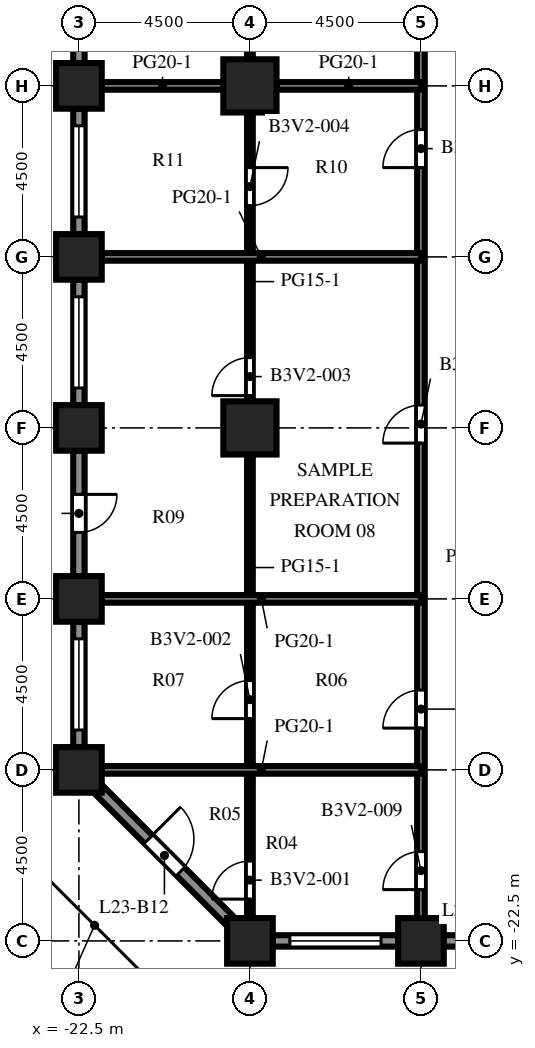
"""IFC4 building model, lengths in metres.
Left out: names, types, materials, properties, quantities, classifications, styles, units other than length and angle.
Written with IfcOpenShell. Run it as: python <this file> out.ifc"""

import sys

from ifc_helpers import new_model, si_unit, direction, frame, frame_2d, origin, origin_2d, place, context, subcontext, project, spatial, rectangle, extrude, element, fill, save


model = new_model("IFC4")
c1 = context("Model", 3, precision=1e-05, world=origin(), true_north=direction((0.0, 1.0)))
c2 = subcontext(c1, "Body", "Model", "MODEL_VIEW")
j1 = project(units=[si_unit("LENGTHUNIT", "METRE"), si_unit("PLANEANGLEUNIT", "RADIAN")], contexts=[c1])
p1 = place(None, origin())
s1 = spatial("IfcSite", under=j1, at=p1, CompositionType="ELEMENT")
p2 = place(p1, origin())
s2 = spatial("IfcBuilding", under=s1, at=p2, CompositionType="ELEMENT")
p3 = place(p2, frame((0.0, 0.0, 102.5)))
s3 = spatial("IfcBuildingStorey", under=s2, at=p3, CompositionType="ELEMENT", Elevation=102.5)
for number, where, z_axis, x_axis in (
    (1, (-22.5, -18.0, 0.0), (0.0, 0.0, 1.0), (1.0, 0.0, 0.0)),
    (2, (-22.5, -13.5, 0.0), (0.0, 0.0, 1.0), (1.0, 0.0, 0.0)),
    (3, (-22.5, -9.0, 0.0), (0.0, 0.0, 1.0), (1.0, 0.0, 0.0)),
    (4, (-22.5, -4.5, 0.0), (0.0, 0.0, 1.0), (1.0, 0.0, 0.0)),
    (5, (-22.5, 0.0, 0.0), (0.0, 0.0, 1.0), (1.0, 0.0, 0.0)),
    (6, (-18.0, -22.5, 0.0), (0.0, 0.0, 1.0), (1.0, 0.0, 0.0)),
    (7, (-13.5, -22.5, 0.0), (0.0, 0.0, 1.0), (1.0, 0.0, 0.0)),
):
    element("IfcColumn", number, at=place(p3, frame(where, z_axis=z_axis, x_axis=x_axis)), inside=s3, PredefinedType="COLUMN", context=c2, shape_type="SweptSolid", body=[
        extrude(rectangle(XDim=1.2, YDim=1.2, at=origin_2d()), origin(), (0.0, 0.0, 1.0), 4.1),
    ])
for number, where, z_axis, x_axis in (
    (8, (-18.0, -9.0, 0.0), (0.0, 0.0, 1.0), (1.0, 0.0, 0.0)),
    (9, (-18.0, 0.0, 0.0), (0.0, 0.0, 1.0), (1.0, 0.0, 0.0)),
):
    element("IfcColumn", number, at=place(p3, frame(where, z_axis=z_axis, x_axis=x_axis)), inside=s3, PredefinedType="COLUMN", context=c2, shape_type="SweptSolid", body=[
        extrude(rectangle(XDim=1.4, YDim=1.4, at=origin_2d()), origin(), (0.0, 0.0, 1.0), 4.1),
    ])
p4 = place(p3, frame((-14.1, -22.5, 0.0), z_axis=(0.0, 0.0, 1.0), x_axis=(-1.0, 0.0, 0.0)))
e10 = element("IfcWall", 10, at=p4, inside=s3, PredefinedType="SOLIDWALL", context=c2, shape_type="SweptSolid", body=[
    extrude(rectangle(XDim=3.3, YDim=0.3, at=frame_2d((1.65, 0.0))), origin(), (0.0, 0.0, 1.0), 2.75),
])
p5 = place(p4, frame((0.45, 0.0, 0.8)))
e11 = element("IfcOpeningElement", 11, at=p5, cuts=e10, PredefinedType="OPENING", context=c2, shape_type="SweptSolid", body=[
    extrude(rectangle(XDim=2.4, YDim=1.7, at=frame_2d((1.2, 0.85))), frame((0.0, 0.16, 0.0), z_axis=(0.0, -1.0, 0.0), x_axis=(1.0, 0.0, 0.0)), (0.0, 0.0, 1.0), 0.32),
])
p6 = place(p3, frame((-9.6, -22.5, 0.0), z_axis=(0.0, 0.0, 1.0), x_axis=(-1.0, 0.0, 0.0)))
e12 = element("IfcWall", 12, at=p6, inside=s3, PredefinedType="SOLIDWALL", context=c2, shape_type="SweptSolid", body=[
    extrude(rectangle(XDim=3.3, YDim=0.3, at=frame_2d((1.65, 0.0))), origin(), (0.0, 0.0, 1.0), 2.75),
])
p7 = place(p6, frame((1.15, 0.0, 0.0)))
e13 = element("IfcOpeningElement", 13, at=p7, cuts=e12, PredefinedType="OPENING", context=c2, shape_type="SweptSolid", body=[
    extrude(rectangle(XDim=1.0, YDim=2.2, at=frame_2d((0.5, 1.1))), frame((0.0, 0.16, 0.0), z_axis=(0.0, -1.0, 0.0), x_axis=(1.0, 0.0, 0.0)), (0.0, 0.0, 1.0), 0.32),
])
p8 = place(p3, frame((-22.5, 0.6, 0.0), z_axis=(0.0, 0.0, 1.0), x_axis=(0.0, 1.0, 0.0)))
e14 = element("IfcWall", 14, at=p8, inside=s3, PredefinedType="SOLIDWALL", context=c2, shape_type="SweptSolid", body=[
    extrude(rectangle(XDim=3.3, YDim=0.3, at=frame_2d((1.65, 0.0))), origin(), (0.0, 0.0, 1.0), 2.75),
])
p9 = place(p8, frame((0.45, 0.0, 0.8)))
e15 = element("IfcOpeningElement", 15, at=p9, cuts=e14, PredefinedType="OPENING", context=c2, shape_type="SweptSolid", body=[
    extrude(rectangle(XDim=2.4, YDim=1.7, at=frame_2d((1.2, 0.85))), frame((0.0, 0.16, 0.0), z_axis=(0.0, -1.0, 0.0), x_axis=(1.0, 0.0, 0.0)), (0.0, 0.0, 1.0), 0.32),
])
p10 = place(p3, frame((-22.5, -3.9, 0.0), z_axis=(0.0, 0.0, 1.0), x_axis=(0.0, 1.0, 0.0)))
e16 = element("IfcWall", 16, at=p10, inside=s3, PredefinedType="SOLIDWALL", context=c2, shape_type="SweptSolid", body=[
    extrude(rectangle(XDim=3.3, YDim=0.3, at=frame_2d((1.65, 0.0))), origin(), (0.0, 0.0, 1.0), 2.75),
])
p11 = place(p10, frame((0.45, 0.0, 0.8)))
e17 = element("IfcOpeningElement", 17, at=p11, cuts=e16, PredefinedType="OPENING", context=c2, shape_type="SweptSolid", body=[
    extrude(rectangle(XDim=2.4, YDim=1.7, at=frame_2d((1.2, 0.85))), frame((0.0, 0.16, 0.0), z_axis=(0.0, -1.0, 0.0), x_axis=(1.0, 0.0, 0.0)), (0.0, 0.0, 1.0), 0.32),
])
p12 = place(p3, frame((-22.5, -8.4, 0.0), z_axis=(0.0, 0.0, 1.0), x_axis=(0.0, 1.0, 0.0)))
e18 = element("IfcWall", 18, at=p12, inside=s3, PredefinedType="SOLIDWALL", context=c2, shape_type="SweptSolid", body=[
    extrude(rectangle(XDim=3.3, YDim=0.3, at=frame_2d((1.65, 0.0))), origin(), (0.0, 0.0, 1.0), 2.75),
])
p13 = place(p12, frame((0.45, 0.0, 0.8)))
e19 = element("IfcOpeningElement", 19, at=p13, cuts=e18, PredefinedType="OPENING", context=c2, shape_type="SweptSolid", body=[
    extrude(rectangle(XDim=2.4, YDim=1.7, at=frame_2d((1.2, 0.85))), frame((0.0, 0.16, 0.0), z_axis=(0.0, -1.0, 0.0), x_axis=(1.0, 0.0, 0.0)), (0.0, 0.0, 1.0), 0.32),
])
p14 = place(p3, frame((-22.5, -12.9, 0.0), z_axis=(0.0, 0.0, 1.0), x_axis=(0.0, 1.0, 0.0)))
e20 = element("IfcWall", 20, at=p14, inside=s3, PredefinedType="SOLIDWALL", context=c2, shape_type="SweptSolid", body=[
    extrude(rectangle(XDim=3.3, YDim=0.3, at=frame_2d((1.65, 0.0))), origin(), (0.0, 0.0, 1.0), 2.75),
])
p15 = place(p14, frame((1.15, 0.0, 0.0)))
e21 = element("IfcOpeningElement", 21, at=p15, cuts=e20, PredefinedType="OPENING", context=c2, shape_type="SweptSolid", body=[
    extrude(rectangle(XDim=1.0, YDim=2.2, at=frame_2d((0.5, 1.1))), frame((0.0, 0.16, 0.0), z_axis=(0.0, -1.0, 0.0), x_axis=(1.0, 0.0, 0.0)), (0.0, 0.0, 1.0), 0.32),
])
p16 = place(p3, frame((-22.5, -17.4, 0.0), z_axis=(0.0, 0.0, 1.0), x_axis=(0.0, 1.0, 0.0)))
e22 = element("IfcWall", 22, at=p16, inside=s3, PredefinedType="SOLIDWALL", context=c2, shape_type="SweptSolid", body=[
    extrude(rectangle(XDim=3.3, YDim=0.3, at=frame_2d((1.65, 0.0))), origin(), (0.0, 0.0, 1.0), 2.75),
])
p17 = place(p16, frame((0.45, 0.0, 0.8)))
e23 = element("IfcOpeningElement", 23, at=p17, cuts=e22, PredefinedType="OPENING", context=c2, shape_type="SweptSolid", body=[
    extrude(rectangle(XDim=2.4, YDim=1.7, at=frame_2d((1.2, 0.85))), frame((0.0, 0.16, 0.0), z_axis=(0.0, -1.0, 0.0), x_axis=(1.0, 0.0, 0.0)), (0.0, 0.0, 1.0), 0.32),
])
p18 = place(p3, frame((-18.494, -22.006, 0.0), z_axis=(0.0, 0.0, 1.0), x_axis=(-0.707106781187, 0.707106781187, 0.0)))
e24 = element("IfcWall", 24, at=p18, inside=s3, PredefinedType="SOLIDWALL", context=c2, shape_type="SweptSolid", body=[
    extrude(rectangle(XDim=4.967, YDim=0.3, at=frame_2d((2.483, 0.0))), origin(), (0.0, 0.0, 1.0), 2.75),
])
p19 = place(p18, frame((1.884, 0.0, 0.0)))
e25 = element("IfcOpeningElement", 25, at=p19, cuts=e24, PredefinedType="OPENING", context=c2, shape_type="SweptSolid", body=[
    extrude(rectangle(XDim=1.2, YDim=2.2, at=frame_2d((0.6, 1.1))), frame((0.0, 0.16, 0.0), z_axis=(0.0, -1.0, 0.0), x_axis=(1.0, 0.0, 0.0)), (0.0, 0.0, 1.0), 0.32),
])
p20 = place(p3, frame((-18.0, -21.9, 0.0), z_axis=(0.0, 0.0, 1.0), x_axis=(0.0, 1.0, 0.0)))
e26 = element("IfcWall", 26, at=p20, inside=s3, PredefinedType="PARTITIONING", context=c2, shape_type="SweptSolid", body=[
    extrude(rectangle(XDim=12.2, YDim=0.15, at=frame_2d((6.1, 0.0))), origin(), (0.0, 0.0, 1.0), 3.65),
])
p21 = place(p20, frame((0.5, 0.0, 0.0)))
e27 = element("IfcOpeningElement", 27, at=p21, cuts=e26, PredefinedType="OPENING", context=c2, shape_type="SweptSolid", body=[
    extrude(rectangle(XDim=1.0, YDim=2.1, at=frame_2d((0.5, 1.05))), frame((0.0, 0.085, 0.0), z_axis=(0.0, -1.0, 0.0), x_axis=(1.0, 0.0, 0.0)), (0.0, 0.0, 1.0), 0.17),
])
p22 = place(p20, frame((5.25, 0.0, 0.0)))
e28 = element("IfcOpeningElement", 28, at=p22, cuts=e26, PredefinedType="OPENING", context=c2, shape_type="SweptSolid", body=[
    extrude(rectangle(XDim=1.0, YDim=2.1, at=frame_2d((0.5, 1.05))), frame((0.0, 0.085, 0.0), z_axis=(0.0, -1.0, 0.0), x_axis=(1.0, 0.0, 0.0)), (0.0, 0.0, 1.0), 0.17),
])
p23 = place(p3, frame((-18.0, -8.3, 0.0), z_axis=(0.0, 0.0, 1.0), x_axis=(0.0, 1.0, 0.0)))
e29 = element("IfcWall", 29, at=p23, inside=s3, PredefinedType="PARTITIONING", context=c2, shape_type="SweptSolid", body=[
    extrude(rectangle(XDim=7.6, YDim=0.15, at=frame_2d((3.8, 0.0))), origin(), (0.0, 0.0, 1.0), 3.65),
])
p24 = place(p23, frame((0.15, 0.0, 0.0)))
e30 = element("IfcOpeningElement", 30, at=p24, cuts=e29, PredefinedType="OPENING", context=c2, shape_type="SweptSolid", body=[
    extrude(rectangle(XDim=1.0, YDim=2.1, at=frame_2d((0.5, 1.05))), frame((0.0, 0.085, 0.0), z_axis=(0.0, -1.0, 0.0), x_axis=(1.0, 0.0, 0.0)), (0.0, 0.0, 1.0), 0.17),
])
p25 = place(p23, frame((5.15, 0.0, 0.0)))
e31 = element("IfcOpeningElement", 31, at=p25, cuts=e29, PredefinedType="OPENING", context=c2, shape_type="SweptSolid", body=[
    extrude(rectangle(XDim=1.0, YDim=2.1, at=frame_2d((0.5, 1.05))), frame((0.0, 0.085, 0.0), z_axis=(0.0, -1.0, 0.0), x_axis=(1.0, 0.0, 0.0)), (0.0, 0.0, 1.0), 0.17),
])
p26 = place(p3, frame((-18.0, 0.7, 0.0), z_axis=(0.0, 0.0, 1.0), x_axis=(0.0, 1.0, 0.0)))
e32 = element("IfcWall", 32, at=p26, inside=s3, PredefinedType="PARTITIONING", context=c2, shape_type="SweptSolid", body=[
    extrude(rectangle(XDim=7.6, YDim=0.15, at=frame_2d((3.8, 0.0))), origin(), (0.0, 0.0, 1.0), 3.65),
])
p27 = place(p26, frame((3.65, 0.0, 0.0)))
e33 = element("IfcOpeningElement", 33, at=p27, cuts=e32, PredefinedType="OPENING", context=c2, shape_type="SweptSolid", body=[
    extrude(rectangle(XDim=1.0, YDim=2.1, at=frame_2d((0.5, 1.05))), frame((0.0, 0.085, 0.0), z_axis=(0.0, -1.0, 0.0), x_axis=(1.0, 0.0, 0.0)), (0.0, 0.0, 1.0), 0.17),
])
p28 = place(p3, frame((-13.5, -21.9, 0.0), z_axis=(0.0, 0.0, 1.0), x_axis=(0.0, 1.0, 0.0)))
e34 = element("IfcWall", 34, at=p28, inside=s3, PredefinedType="PARTITIONING", context=c2, shape_type="SweptSolid", body=[
    extrude(rectangle(XDim=52.8, YDim=0.2, at=frame_2d((26.4, 0.0))), origin(), (0.0, 0.0, 1.0), 3.65),
])
p29 = place(p28, frame((0.75, 0.0, 0.0)))
e35 = element("IfcOpeningElement", 35, at=p29, cuts=e34, PredefinedType="OPENING", context=c2, shape_type="SweptSolid", body=[
    extrude(rectangle(XDim=1.0, YDim=2.1, at=frame_2d((0.5, 1.05))), frame((0.0, 0.11, 0.0), z_axis=(0.0, -1.0, 0.0), x_axis=(1.0, 0.0, 0.0)), (0.0, 0.0, 1.0), 0.22),
])
p30 = place(p28, frame((5.0, 0.0, 0.0)))
e36 = element("IfcOpeningElement", 36, at=p30, cuts=e34, PredefinedType="OPENING", context=c2, shape_type="SweptSolid", body=[
    extrude(rectangle(XDim=1.0, YDim=2.1, at=frame_2d((0.5, 1.05))), frame((0.0, 0.11, 0.0), z_axis=(0.0, -1.0, 0.0), x_axis=(1.0, 0.0, 0.0)), (0.0, 0.0, 1.0), 0.22),
])
p31 = place(p28, frame((12.5, 0.0, 0.0)))
e37 = element("IfcOpeningElement", 37, at=p31, cuts=e34, PredefinedType="OPENING", context=c2, shape_type="SweptSolid", body=[
    extrude(rectangle(XDim=1.0, YDim=2.1, at=frame_2d((0.5, 1.05))), frame((0.0, 0.11, 0.0), z_axis=(0.0, -1.0, 0.0), x_axis=(1.0, 0.0, 0.0)), (0.0, 0.0, 1.0), 0.22),
])
p32 = place(p28, frame((19.75, 0.0, 0.0)))
e38 = element("IfcOpeningElement", 38, at=p32, cuts=e34, PredefinedType="OPENING", context=c2, shape_type="SweptSolid", body=[
    extrude(rectangle(XDim=1.0, YDim=2.1, at=frame_2d((0.5, 1.05))), frame((0.0, 0.11, 0.0), z_axis=(0.0, -1.0, 0.0), x_axis=(1.0, 0.0, 0.0)), (0.0, 0.0, 1.0), 0.22),
])
p33 = place(p28, frame((26.0, 0.0, 0.0)))
e39 = element("IfcOpeningElement", 39, at=p33, cuts=e34, PredefinedType="OPENING", context=c2, shape_type="SweptSolid", body=[
    extrude(rectangle(XDim=1.0, YDim=2.1, at=frame_2d((0.5, 1.05))), frame((0.0, 0.11, 0.0), z_axis=(0.0, -1.0, 0.0), x_axis=(1.0, 0.0, 0.0)), (0.0, 0.0, 1.0), 0.22),
])
p34 = place(p28, frame((37.5, 0.0, 0.0)))
e40 = element("IfcOpeningElement", 40, at=p34, cuts=e34, PredefinedType="OPENING", context=c2, shape_type="SweptSolid", body=[
    extrude(rectangle(XDim=1.0, YDim=2.1, at=frame_2d((0.5, 1.05))), frame((0.0, 0.11, 0.0), z_axis=(0.0, -1.0, 0.0), x_axis=(1.0, 0.0, 0.0)), (0.0, 0.0, 1.0), 0.22),
])
p35 = place(p28, frame((43.25, 0.0, 0.0)))
e41 = element("IfcOpeningElement", 41, at=p35, cuts=e34, PredefinedType="OPENING", context=c2, shape_type="SweptSolid", body=[
    extrude(rectangle(XDim=1.0, YDim=2.1, at=frame_2d((0.5, 1.05))), frame((0.0, 0.11, 0.0), z_axis=(0.0, -1.0, 0.0), x_axis=(1.0, 0.0, 0.0)), (0.0, 0.0, 1.0), 0.22),
])
p36 = place(p28, frame((50.0, 0.0, 0.0)))
e42 = element("IfcOpeningElement", 42, at=p36, cuts=e34, PredefinedType="OPENING", context=c2, shape_type="SweptSolid", body=[
    extrude(rectangle(XDim=1.0, YDim=2.1, at=frame_2d((0.5, 1.05))), frame((0.0, 0.11, 0.0), z_axis=(0.0, -1.0, 0.0), x_axis=(1.0, 0.0, 0.0)), (0.0, 0.0, 1.0), 0.22),
])
for number, where, z_axis, x_axis in (
    (43, (-21.9, -18.0, 0.0), (0.0, 0.0, 1.0), (1.0, 0.0, 0.0)),
    (44, (-21.9, -13.5, 0.0), (0.0, 0.0, 1.0), (1.0, 0.0, 0.0)),
    (45, (-21.9, -4.5, 0.0), (0.0, 0.0, 1.0), (1.0, 0.0, 0.0)),
):
    element("IfcWall", number, at=place(p3, frame(where, z_axis=z_axis, x_axis=x_axis)), inside=s3, PredefinedType="PARTITIONING", context=c2, shape_type="SweptSolid", body=[
        extrude(rectangle(XDim=8.4, YDim=0.2, at=frame_2d((4.2, 0.0))), origin(), (0.0, 0.0, 1.0), 3.65),
    ])
p37 = place(p3, frame((-21.9, 0.0, 0.0), z_axis=(0.0, 0.0, 1.0), x_axis=(1.0, 0.0, 0.0)))
e46 = element("IfcWall", 46, at=p37, inside=s3, PredefinedType="PARTITIONING", context=c2, shape_type="SweptSolid", body=[
    extrude(rectangle(XDim=3.2, YDim=0.2, at=frame_2d((1.6, 0.0))), origin(), (0.0, 0.0, 1.0), 3.65),
])
p38 = place(p3, frame((-17.3, 0.0, 0.0), z_axis=(0.0, 0.0, 1.0), x_axis=(1.0, 0.0, 0.0)))
e47 = element("IfcWall", 47, at=p38, inside=s3, PredefinedType="PARTITIONING", context=c2, shape_type="SweptSolid", body=[
    extrude(rectangle(XDim=3.8, YDim=0.2, at=frame_2d((1.9, 0.0))), origin(), (0.0, 0.0, 1.0), 3.65),
])
p39 = place(p5, origin())
e48 = element("IfcWindow", 48, at=p39, inside=s3, PartitioningType="SINGLE_PANEL", PredefinedType="WINDOW", context=c2, shape_type="SweptSolid", body=[
    extrude(rectangle(XDim=2.4, YDim=1.7, at=frame_2d((1.2, 0.85))), frame((0.0, 0.03, 0.0), z_axis=(0.0, -1.0, 0.0), x_axis=(1.0, 0.0, 0.0)), (0.0, 0.0, 1.0), 0.06),
])
fill(e11, e48)
p40 = place(p11, origin())
e49 = element("IfcWindow", 49, at=p40, inside=s3, PartitioningType="SINGLE_PANEL", PredefinedType="WINDOW", context=c2, shape_type="SweptSolid", body=[
    extrude(rectangle(XDim=2.4, YDim=1.7, at=frame_2d((1.2, 0.85))), frame((0.0, 0.03, 0.0), z_axis=(0.0, -1.0, 0.0), x_axis=(1.0, 0.0, 0.0)), (0.0, 0.0, 1.0), 0.06),
])
fill(e17, e49)
p41 = place(p13, origin())
e50 = element("IfcWindow", 50, at=p41, inside=s3, PartitioningType="SINGLE_PANEL", PredefinedType="WINDOW", context=c2, shape_type="SweptSolid", body=[
    extrude(rectangle(XDim=2.4, YDim=1.7, at=frame_2d((1.2, 0.85))), frame((0.0, 0.03, 0.0), z_axis=(0.0, -1.0, 0.0), x_axis=(1.0, 0.0, 0.0)), (0.0, 0.0, 1.0), 0.06),
])
fill(e19, e50)
p42 = place(p15, origin())
e51 = element("IfcDoor", 51, at=p42, inside=s3, OperationType="SINGLE_SWING_RIGHT", PredefinedType="DOOR", context=c2, shape_type="SweptSolid", body=[
    extrude(rectangle(XDim=1.0, YDim=2.2, at=frame_2d((0.5, 1.1))), frame((0.0, 0.025, 0.0), z_axis=(0.0, -1.0, 0.0), x_axis=(1.0, 0.0, 0.0)), (0.0, 0.0, 1.0), 0.05),
])
fill(e21, e51)
p43 = place(p17, origin())
e52 = element("IfcWindow", 52, at=p43, inside=s3, PartitioningType="SINGLE_PANEL", PredefinedType="WINDOW", context=c2, shape_type="SweptSolid", body=[
    extrude(rectangle(XDim=2.4, YDim=1.7, at=frame_2d((1.2, 0.85))), frame((0.0, 0.03, 0.0), z_axis=(0.0, -1.0, 0.0), x_axis=(1.0, 0.0, 0.0)), (0.0, 0.0, 1.0), 0.06),
])
fill(e23, e52)
p44 = place(p19, origin())
e53 = element("IfcDoor", 53, at=p44, inside=s3, OperationType="SINGLE_SWING_RIGHT", PredefinedType="DOOR", context=c2, shape_type="SweptSolid", body=[
    extrude(rectangle(XDim=1.2, YDim=2.2, at=frame_2d((0.6, 1.1))), frame((0.0, 0.025, 0.0), z_axis=(0.0, -1.0, 0.0), x_axis=(1.0, 0.0, 0.0)), (0.0, 0.0, 1.0), 0.05),
])
fill(e25, e53)
p45 = place(p21, origin())
e54 = element("IfcDoor", 54, at=p45, inside=s3, OperationType="SINGLE_SWING_LEFT", PredefinedType="DOOR", context=c2, shape_type="SweptSolid", body=[
    extrude(rectangle(XDim=1.0, YDim=2.1, at=frame_2d((0.5, 1.05))), frame((0.0, 0.025, 0.0), z_axis=(0.0, -1.0, 0.0), x_axis=(1.0, 0.0, 0.0)), (0.0, 0.0, 1.0), 0.05),
])
fill(e27, e54)
p46 = place(p22, origin())
e55 = element("IfcDoor", 55, at=p46, inside=s3, OperationType="SINGLE_SWING_LEFT", PredefinedType="DOOR", context=c2, shape_type="SweptSolid", body=[
    extrude(rectangle(XDim=1.0, YDim=2.1, at=frame_2d((0.5, 1.05))), frame((0.0, 0.025, 0.0), z_axis=(0.0, -1.0, 0.0), x_axis=(1.0, 0.0, 0.0)), (0.0, 0.0, 1.0), 0.05),
])
fill(e28, e55)
p47 = place(p24, origin())
e56 = element("IfcDoor", 56, at=p47, inside=s3, OperationType="SINGLE_SWING_LEFT", PredefinedType="DOOR", context=c2, shape_type="SweptSolid", body=[
    extrude(rectangle(XDim=1.0, YDim=2.1, at=frame_2d((0.5, 1.05))), frame((0.0, 0.025, 0.0), z_axis=(0.0, -1.0, 0.0), x_axis=(1.0, 0.0, 0.0)), (0.0, 0.0, 1.0), 0.05),
])
fill(e30, e56)
p48 = place(p25, origin())
e57 = element("IfcDoor", 57, at=p48, inside=s3, OperationType="SINGLE_SWING_RIGHT", PredefinedType="DOOR", context=c2, shape_type="SweptSolid", body=[
    extrude(rectangle(XDim=1.0, YDim=2.1, at=frame_2d((0.5, 1.05))), frame((0.0, 0.025, 0.0), z_axis=(0.0, -1.0, 0.0), x_axis=(1.0, 0.0, 0.0)), (0.0, 0.0, 1.0), 0.05),
])
fill(e31, e57)
p49 = place(p29, origin())
e58 = element("IfcDoor", 58, at=p49, inside=s3, OperationType="SINGLE_SWING_LEFT", PredefinedType="DOOR", context=c2, shape_type="SweptSolid", body=[
    extrude(rectangle(XDim=1.0, YDim=2.1, at=frame_2d((0.5, 1.05))), frame((0.0, 0.025, 0.0), z_axis=(0.0, -1.0, 0.0), x_axis=(1.0, 0.0, 0.0)), (0.0, 0.0, 1.0), 0.05),
])
fill(e35, e58)
p50 = place(p30, origin())
e59 = element("IfcDoor", 59, at=p50, inside=s3, OperationType="SINGLE_SWING_LEFT", PredefinedType="DOOR", context=c2, shape_type="SweptSolid", body=[
    extrude(rectangle(XDim=1.0, YDim=2.1, at=frame_2d((0.5, 1.05))), frame((0.0, 0.025, 0.0), z_axis=(0.0, -1.0, 0.0), x_axis=(1.0, 0.0, 0.0)), (0.0, 0.0, 1.0), 0.05),
])
fill(e36, e59)
p51 = place(p31, origin())
e60 = element("IfcDoor", 60, at=p51, inside=s3, OperationType="SINGLE_SWING_LEFT", PredefinedType="DOOR", context=c2, shape_type="SweptSolid", body=[
    extrude(rectangle(XDim=1.0, YDim=2.1, at=frame_2d((0.5, 1.05))), frame((0.0, 0.025, 0.0), z_axis=(0.0, -1.0, 0.0), x_axis=(1.0, 0.0, 0.0)), (0.0, 0.0, 1.0), 0.05),
])
fill(e37, e60)
p52 = place(p32, origin())
e61 = element("IfcDoor", 61, at=p52, inside=s3, OperationType="SINGLE_SWING_LEFT", PredefinedType="DOOR", context=c2, shape_type="SweptSolid", body=[
    extrude(rectangle(XDim=1.0, YDim=2.1, at=frame_2d((0.5, 1.05))), frame((0.0, 0.025, 0.0), z_axis=(0.0, -1.0, 0.0), x_axis=(1.0, 0.0, 0.0)), (0.0, 0.0, 1.0), 0.05),
])
fill(e38, e61)
save(model, sys.argv[1])
